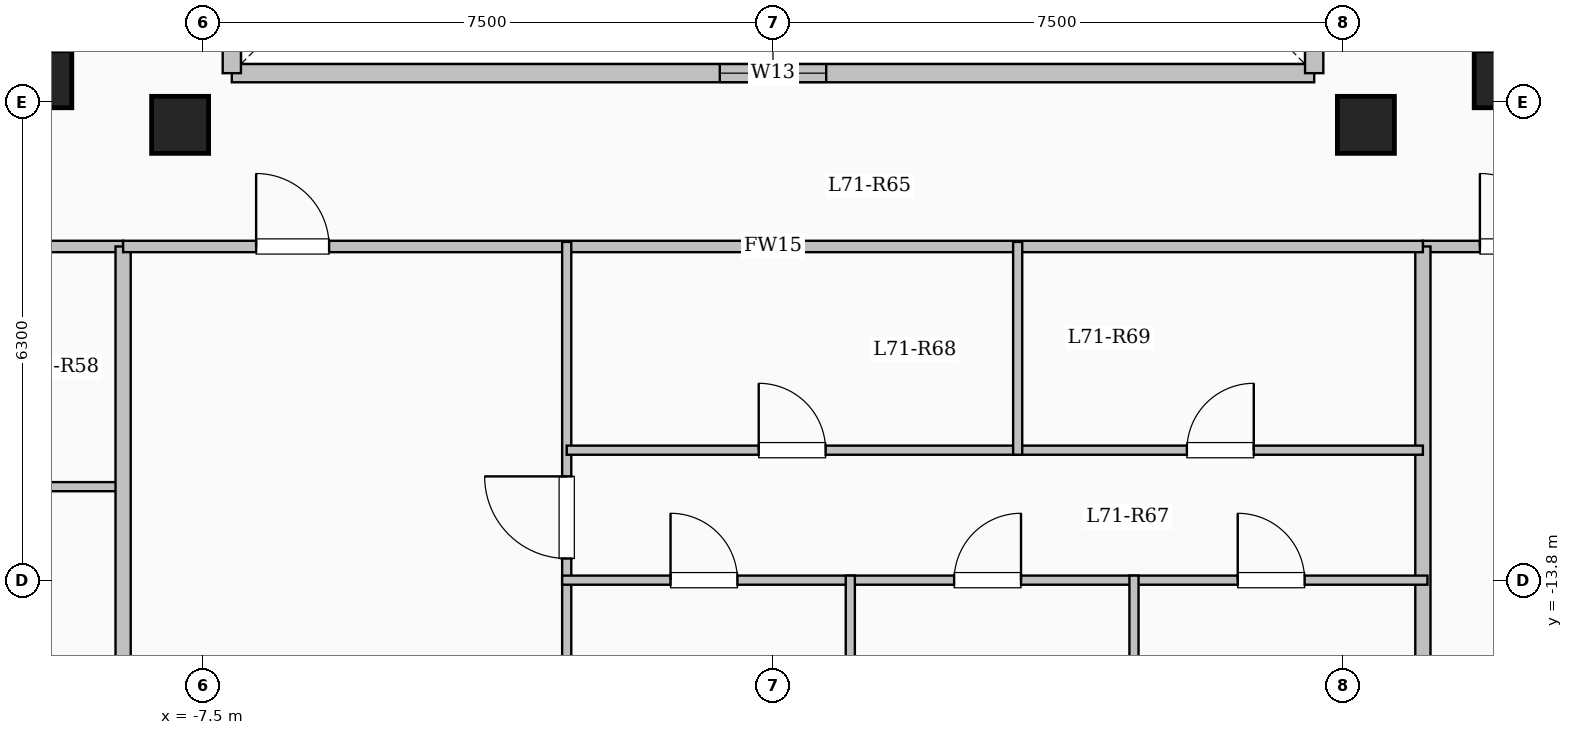
"""IFC4 building model, lengths in metres.
Left out: names, types, materials, properties, quantities, classifications, styles, units other than length and angle.
Written with IfcOpenShell. Run it as: python <this file> out.ifc"""

import sys

from ifc_helpers import new_model, si_unit, direction, frame, frame_2d, origin, origin_2d, place, context, subcontext, project, spatial, rectangle, extrude, element, fill, save


model = new_model("IFC4")
c1 = context("Model", 3, precision=1e-05, world=origin(), true_north=direction((0.0, 1.0)))
c2 = subcontext(c1, "Body", "Model", "MODEL_VIEW")
j1 = project(units=[si_unit("LENGTHUNIT", "METRE"), si_unit("PLANEANGLEUNIT", "RADIAN")], contexts=[c1])
p1 = place(None, origin())
s1 = spatial("IfcSite", under=j1, at=p1, CompositionType="ELEMENT")
p2 = place(p1, origin())
s2 = spatial("IfcBuilding", under=s1, at=p2, CompositionType="ELEMENT")
p3 = place(p2, frame((0.0, 0.0, 261.6)))
s3 = spatial("IfcBuildingStorey", under=s2, at=p3, CompositionType="ELEMENT", Elevation=261.6)
for number, where, z_axis, x_axis in (
    (1, (-7.8, -7.8, 0.0), (0.0, 0.0, 1.0), (1.0, 0.0, 0.0)),
    (2, (7.8, -7.8, 0.0), (0.0, 0.0, 1.0), (1.0, 0.0, 0.0)),
    (3, (-9.6, -7.2, 0.0), (0.0, 0.0, 1.0), (1.0, 0.0, 0.0)),
    (4, (9.6, -7.2, 0.0), (0.0, 0.0, 1.0), (1.0, 0.0, 0.0)),
):
    element("IfcColumn", number, at=place(p3, frame(where, z_axis=z_axis, x_axis=x_axis)), inside=s3, PredefinedType="COLUMN", context=c2, shape_type="SweptSolid", body=[
        extrude(rectangle(XDim=0.75, YDim=0.75, at=origin_2d()), origin(), (0.0, 0.0, 1.0), 3.35),
    ])
p4 = place(p3, frame((-7.12, -7.12, 0.0), z_axis=(0.0, 0.0, 1.0), x_axis=(1.0, 0.0, 0.0)))
e5 = element("IfcWall", 5, at=p4, inside=s3, PredefinedType="SOLIDWALL", context=c2, shape_type="SweptSolid", body=[
    extrude(rectangle(XDim=14.24, YDim=0.24, at=frame_2d((7.12, 0.0))), origin(), (0.0, 0.0, 1.0), 3.1),
])
p5 = place(p4, frame((6.42, 0.0, 0.95)))
e6 = element("IfcOpeningElement", 6, at=p5, cuts=e5, PredefinedType="OPENING", context=c2, shape_type="SweptSolid", body=[
    extrude(rectangle(XDim=1.4, YDim=1.5, at=frame_2d((0.7, 0.75))), frame((0.0, 0.13, 0.0), z_axis=(0.0, -1.0, 0.0), x_axis=(1.0, 0.0, 0.0)), (0.0, 0.0, 1.0), 0.26),
])
p6 = place(p3, frame((7.12, -7.12, 0.0), z_axis=(0.0, 0.0, 1.0), x_axis=(0.0, 1.0, 0.0)))
e7 = element("IfcWall", 7, at=p6, inside=s3, PredefinedType="SOLIDWALL", context=c2, shape_type="SweptSolid", body=[
    extrude(rectangle(XDim=14.24, YDim=0.24, at=frame_2d((7.12, 0.0))), origin(), (0.0, 0.0, 1.0), 3.1),
])
p7 = place(p6, frame((6.42, 0.0, 0.95)))
e8 = element("IfcOpeningElement", 8, at=p7, cuts=e7, PredefinedType="OPENING", context=c2, shape_type="SweptSolid", body=[
    extrude(rectangle(XDim=1.4, YDim=1.5, at=frame_2d((0.7, 0.75))), frame((0.0, 0.13, 0.0), z_axis=(0.0, -1.0, 0.0), x_axis=(1.0, 0.0, 0.0)), (0.0, 0.0, 1.0), 0.26),
])
p8 = place(p3, frame((-7.12, 7.12, 0.0), z_axis=(0.0, 0.0, 1.0), x_axis=(0.0, -1.0, 0.0)))
e9 = element("IfcWall", 9, at=p8, inside=s3, PredefinedType="SOLIDWALL", context=c2, shape_type="SweptSolid", body=[
    extrude(rectangle(XDim=14.24, YDim=0.24, at=frame_2d((7.12, 0.0))), origin(), (0.0, 0.0, 1.0), 3.1),
])
p9 = place(p8, frame((6.42, 0.0, 0.95)))
e10 = element("IfcOpeningElement", 10, at=p9, cuts=e9, PredefinedType="OPENING", context=c2, shape_type="SweptSolid", body=[
    extrude(rectangle(XDim=1.4, YDim=1.5, at=frame_2d((0.7, 0.75))), frame((0.0, 0.13, 0.0), z_axis=(0.0, -1.0, 0.0), x_axis=(1.0, 0.0, 0.0)), (0.0, 0.0, 1.0), 0.26),
])
p10 = place(p3, frame((-17.75, -9.4, 0.0), z_axis=(0.0, 0.0, 1.0), x_axis=(1.0, 0.0, 0.0)))
e11 = element("IfcWall", 11, at=p10, inside=s3, PredefinedType="PARTITIONING", context=c2, shape_type="SweptSolid", body=[
    extrude(rectangle(XDim=9.2, YDim=0.15, at=frame_2d((4.6, 0.0))), origin(), (0.0, 0.0, 1.0), 3.1),
])
p11 = place(p10, frame((0.7, 0.0, 0.0)))
e12 = element("IfcOpeningElement", 12, at=p11, cuts=e11, PredefinedType="OPENING", context=c2, shape_type="SweptSolid", body=[
    extrude(rectangle(XDim=0.96, YDim=2.15, at=frame_2d((0.48, 1.075))), frame((0.0, 0.085, 0.0), z_axis=(0.0, -1.0, 0.0), x_axis=(1.0, 0.0, 0.0)), (0.0, 0.0, 1.0), 0.17),
])
p12 = place(p10, frame((5.275, 0.0, 0.0)))
e13 = element("IfcOpeningElement", 13, at=p12, cuts=e11, PredefinedType="OPENING", context=c2, shape_type="SweptSolid", body=[
    extrude(rectangle(XDim=0.96, YDim=2.15, at=frame_2d((0.48, 1.075))), frame((0.0, 0.085, 0.0), z_axis=(0.0, -1.0, 0.0), x_axis=(1.0, 0.0, 0.0)), (0.0, 0.0, 1.0), 0.17),
])
p13 = place(p3, frame((8.55, -9.4, 0.0), z_axis=(0.0, 0.0, 1.0), x_axis=(1.0, 0.0, 0.0)))
e14 = element("IfcWall", 14, at=p13, inside=s3, PredefinedType="PARTITIONING", context=c2, shape_type="SweptSolid", body=[
    extrude(rectangle(XDim=9.2, YDim=0.15, at=frame_2d((4.6, 0.0))), origin(), (0.0, 0.0, 1.0), 3.1),
])
p14 = place(p13, frame((0.75, 0.0, 0.0)))
e15 = element("IfcOpeningElement", 15, at=p14, cuts=e14, PredefinedType="OPENING", context=c2, shape_type="SweptSolid", body=[
    extrude(rectangle(XDim=0.96, YDim=2.15, at=frame_2d((0.48, 1.075))), frame((0.0, 0.085, 0.0), z_axis=(0.0, -1.0, 0.0), x_axis=(1.0, 0.0, 0.0)), (0.0, 0.0, 1.0), 0.17),
])
p15 = place(p13, frame((5.142, 0.0, 0.0)))
e16 = element("IfcOpeningElement", 16, at=p15, cuts=e14, PredefinedType="OPENING", context=c2, shape_type="SweptSolid", body=[
    extrude(rectangle(XDim=0.96, YDim=2.15, at=frame_2d((0.48, 1.075))), frame((0.0, 0.085, 0.0), z_axis=(0.0, -1.0, 0.0), x_axis=(1.0, 0.0, 0.0)), (0.0, 0.0, 1.0), 0.17),
])
p16 = place(p3, frame((-10.775, -12.56, 0.0), z_axis=(0.0, 0.0, 1.0), x_axis=(1.0, 0.0, 0.0)))
e17 = element("IfcWall", 17, at=p16, inside=s3, PredefinedType="PARTITIONING", context=c2, shape_type="SweptSolid", body=[
    extrude(rectangle(XDim=2.235, YDim=0.12, at=frame_2d((1.117, 0.0))), origin(), (0.0, 0.0, 1.0), 2.785),
])
for number, where, z_axis, x_axis in (
    (18, (-8.55, -21.504, 0.0), (0.0, 0.0, 1.0), (0.0, 1.0, 0.0)),
    (19, (8.55, -21.504, 0.0), (0.0, 0.0, 1.0), (0.0, 1.0, 0.0)),
):
    element("IfcWall", number, at=place(p3, frame(where, z_axis=z_axis, x_axis=x_axis)), inside=s3, PredefinedType="SOLIDWALL", context=c2, shape_type="SweptSolid", body=[
        extrude(rectangle(XDim=12.104, YDim=0.2, at=frame_2d((6.052, 0.0))), origin(), (0.0, 0.0, 1.0), 3.1),
    ])
p17 = place(p3, frame((-8.55, -9.4, 0.0), z_axis=(0.0, 0.0, 1.0), x_axis=(1.0, 0.0, 0.0)))
e20 = element("IfcWall", 20, at=p17, inside=s3, PredefinedType="PARTITIONING", context=c2, shape_type="SweptSolid", body=[
    extrude(rectangle(XDim=17.1, YDim=0.15, at=frame_2d((8.55, 0.0))), origin(), (0.0, 0.0, 1.0), 3.1),
])
p18 = place(p17, frame((1.75, 0.0, 0.0)))
e21 = element("IfcOpeningElement", 21, at=p18, cuts=e20, PredefinedType="OPENING", context=c2, shape_type="SweptSolid", body=[
    extrude(rectangle(XDim=0.96, YDim=2.15, at=frame_2d((0.48, 1.075))), frame((0.0, 0.085, 0.0), z_axis=(0.0, -1.0, 0.0), x_axis=(1.0, 0.0, 0.0)), (0.0, 0.0, 1.0), 0.17),
])
p19 = place(p3, frame((-2.714, -22.38, 0.0), z_axis=(0.0, 0.0, 1.0), x_axis=(0.0, 1.0, 0.0)))
e22 = element("IfcWall", 22, at=p19, inside=s3, PredefinedType="PARTITIONING", context=c2, shape_type="SweptSolid", body=[
    extrude(rectangle(XDim=13.04, YDim=0.12, at=frame_2d((6.52, 0.0))), origin(), (0.0, 0.0, 1.0), 3.1),
])
p20 = place(p19, frame((8.875, 0.0, 0.0)))
e23 = element("IfcOpeningElement", 23, at=p20, cuts=e22, PredefinedType="OPENING", context=c2, shape_type="SweptSolid", body=[
    extrude(rectangle(XDim=1.08, YDim=2.15, at=frame_2d((0.54, 1.075))), frame((0.0, 0.07, 0.0), z_axis=(0.0, -1.0, 0.0), x_axis=(1.0, 0.0, 0.0)), (0.0, 0.0, 1.0), 0.14),
])
p21 = place(p3, frame((-2.714, -12.08, 0.0), z_axis=(0.0, 0.0, 1.0), x_axis=(1.0, 0.0, 0.0)))
e24 = element("IfcWall", 24, at=p21, inside=s3, PredefinedType="PARTITIONING", context=c2, shape_type="SweptSolid", body=[
    extrude(rectangle(XDim=5.933, YDim=0.12, at=frame_2d((2.967, 0.0))), origin(), (0.0, 0.0, 1.0), 2.785),
])
p22 = place(p21, frame((2.526, 0.0, 0.0)))
e25 = element("IfcOpeningElement", 25, at=p22, cuts=e24, PredefinedType="OPENING", context=c2, shape_type="SweptSolid", body=[
    extrude(rectangle(XDim=0.88, YDim=2.1, at=frame_2d((0.44, 1.05))), frame((0.0, 0.07, 0.0), z_axis=(0.0, -1.0, 0.0), x_axis=(1.0, 0.0, 0.0)), (0.0, 0.0, 1.0), 0.14),
])
p23 = place(p3, frame((3.219, -12.08, 0.0), z_axis=(0.0, 0.0, 1.0), x_axis=(1.0, 0.0, 0.0)))
e26 = element("IfcWall", 26, at=p23, inside=s3, PredefinedType="PARTITIONING", context=c2, shape_type="SweptSolid", body=[
    extrude(rectangle(XDim=5.331, YDim=0.12, at=frame_2d((2.666, 0.0))), origin(), (0.0, 0.0, 1.0), 2.785),
])
p24 = place(p23, frame((2.226, 0.0, 0.0)))
e27 = element("IfcOpeningElement", 27, at=p24, cuts=e26, PredefinedType="OPENING", context=c2, shape_type="SweptSolid", body=[
    extrude(rectangle(XDim=0.88, YDim=2.1, at=frame_2d((0.44, 1.05))), frame((0.0, 0.07, 0.0), z_axis=(0.0, -1.0, 0.0), x_axis=(1.0, 0.0, 0.0)), (0.0, 0.0, 1.0), 0.14),
])
p25 = place(p3, frame((-2.774, -13.79, 0.0), z_axis=(0.0, 0.0, 1.0), x_axis=(1.0, 0.0, 0.0)))
e28 = element("IfcWall", 28, at=p25, inside=s3, PredefinedType="PARTITIONING", context=c2, shape_type="SweptSolid", body=[
    extrude(rectangle(XDim=11.384, YDim=0.12, at=frame_2d((5.692, 0.0))), origin(), (0.0, 0.0, 1.0), 2.785),
])
p26 = place(p25, frame((1.426, 0.0, 0.0)))
e29 = element("IfcOpeningElement", 29, at=p26, cuts=e28, PredefinedType="OPENING", context=c2, shape_type="SweptSolid", body=[
    extrude(rectangle(XDim=0.88, YDim=2.1, at=frame_2d((0.44, 1.05))), frame((0.0, 0.07, 0.0), z_axis=(0.0, -1.0, 0.0), x_axis=(1.0, 0.0, 0.0)), (0.0, 0.0, 1.0), 0.14),
])
p27 = place(p25, frame((5.157, 0.0, 0.0)))
e30 = element("IfcOpeningElement", 30, at=p27, cuts=e28, PredefinedType="OPENING", context=c2, shape_type="SweptSolid", body=[
    extrude(rectangle(XDim=0.88, YDim=2.1, at=frame_2d((0.44, 1.05))), frame((0.0, 0.07, 0.0), z_axis=(0.0, -1.0, 0.0), x_axis=(1.0, 0.0, 0.0)), (0.0, 0.0, 1.0), 0.14),
])
p28 = place(p25, frame((8.888, 0.0, 0.0)))
e31 = element("IfcOpeningElement", 31, at=p28, cuts=e28, PredefinedType="OPENING", context=c2, shape_type="SweptSolid", body=[
    extrude(rectangle(XDim=0.88, YDim=2.1, at=frame_2d((0.44, 1.05))), frame((0.0, 0.07, 0.0), z_axis=(0.0, -1.0, 0.0), x_axis=(1.0, 0.0, 0.0)), (0.0, 0.0, 1.0), 0.14),
])
p29 = place(p3, frame((3.219, -12.14, 0.0), z_axis=(0.0, 0.0, 1.0), x_axis=(0.0, 1.0, 0.0)))
e32 = element("IfcWall", 32, at=p29, inside=s3, PredefinedType="PARTITIONING", context=c2, shape_type="SweptSolid", body=[
    extrude(rectangle(XDim=2.8, YDim=0.12, at=frame_2d((1.4, 0.0))), origin(), (0.0, 0.0, 1.0), 3.1),
])
for number, where, z_axis, x_axis in (
    (33, (1.017, -22.38, 0.0), (0.0, 0.0, 1.0), (0.0, 1.0, 0.0)),
    (34, (4.749, -22.38, 0.0), (0.0, 0.0, 1.0), (0.0, 1.0, 0.0)),
):
    element("IfcWall", number, at=place(p3, frame(where, z_axis=z_axis, x_axis=x_axis)), inside=s3, PredefinedType="PARTITIONING", context=c2, shape_type="SweptSolid", body=[
        extrude(rectangle(XDim=8.65, YDim=0.12, at=frame_2d((4.325, 0.0))), origin(), (0.0, 0.0, 1.0), 3.1),
    ])
p30 = place(p5, origin())
e35 = element("IfcWindow", 35, at=p30, inside=s3, PartitioningType="SINGLE_PANEL", PredefinedType="WINDOW", context=c2, shape_type="SweptSolid", body=[
    extrude(rectangle(XDim=1.4, YDim=1.5, at=frame_2d((0.7, 0.75))), frame((0.0, 0.03, 0.0), z_axis=(0.0, -1.0, 0.0), x_axis=(1.0, 0.0, 0.0)), (0.0, 0.0, 1.0), 0.06),
])
fill(e6, e35)
p31 = place(p14, origin())
e36 = element("IfcDoor", 36, at=p31, inside=s3, OperationType="SINGLE_SWING_LEFT", PredefinedType="DOOR", context=c2, shape_type="SweptSolid", body=[
    extrude(rectangle(XDim=0.96, YDim=2.15, at=frame_2d((0.48, 1.075))), frame((0.0, 0.025, 0.0), z_axis=(0.0, -1.0, 0.0), x_axis=(1.0, 0.0, 0.0)), (0.0, 0.0, 1.0), 0.05),
])
fill(e15, e36)
p32 = place(p18, origin())
e37 = element("IfcDoor", 37, at=p32, inside=s3, OperationType="SINGLE_SWING_LEFT", PredefinedType="DOOR", context=c2, shape_type="SweptSolid", body=[
    extrude(rectangle(XDim=0.96, YDim=2.15, at=frame_2d((0.48, 1.075))), frame((0.0, 0.025, 0.0), z_axis=(0.0, -1.0, 0.0), x_axis=(1.0, 0.0, 0.0)), (0.0, 0.0, 1.0), 0.05),
])
fill(e21, e37)
p33 = place(p20, origin())
e38 = element("IfcDoor", 38, at=p33, inside=s3, OperationType="SINGLE_SWING_RIGHT", PredefinedType="DOOR", context=c2, shape_type="SweptSolid", body=[
    extrude(rectangle(XDim=1.08, YDim=2.15, at=frame_2d((0.54, 1.075))), frame((0.0, 0.025, 0.0), z_axis=(0.0, -1.0, 0.0), x_axis=(1.0, 0.0, 0.0)), (0.0, 0.0, 1.0), 0.05),
])
fill(e23, e38)
p34 = place(p22, origin())
e39 = element("IfcDoor", 39, at=p34, inside=s3, OperationType="SINGLE_SWING_LEFT", PredefinedType="DOOR", context=c2, shape_type="SweptSolid", body=[
    extrude(rectangle(XDim=0.88, YDim=2.1, at=frame_2d((0.44, 1.05))), frame((0.0, 0.025, 0.0), z_axis=(0.0, -1.0, 0.0), x_axis=(1.0, 0.0, 0.0)), (0.0, 0.0, 1.0), 0.05),
])
fill(e25, e39)
p35 = place(p24, origin())
e40 = element("IfcDoor", 40, at=p35, inside=s3, OperationType="SINGLE_SWING_RIGHT", PredefinedType="DOOR", context=c2, shape_type="SweptSolid", body=[
    extrude(rectangle(XDim=0.88, YDim=2.1, at=frame_2d((0.44, 1.05))), frame((0.0, 0.025, 0.0), z_axis=(0.0, -1.0, 0.0), x_axis=(1.0, 0.0, 0.0)), (0.0, 0.0, 1.0), 0.05),
])
fill(e27, e40)
p36 = place(p26, origin())
e41 = element("IfcDoor", 41, at=p36, inside=s3, OperationType="SINGLE_SWING_LEFT", PredefinedType="DOOR", context=c2, shape_type="SweptSolid", body=[
    extrude(rectangle(XDim=0.88, YDim=2.1, at=frame_2d((0.44, 1.05))), frame((0.0, 0.025, 0.0), z_axis=(0.0, -1.0, 0.0), x_axis=(1.0, 0.0, 0.0)), (0.0, 0.0, 1.0), 0.05),
])
fill(e29, e41)
p37 = place(p27, origin())
e42 = element("IfcDoor", 42, at=p37, inside=s3, OperationType="SINGLE_SWING_RIGHT", PredefinedType="DOOR", context=c2, shape_type="SweptSolid", body=[
    extrude(rectangle(XDim=0.88, YDim=2.1, at=frame_2d((0.44, 1.05))), frame((0.0, 0.025, 0.0), z_axis=(0.0, -1.0, 0.0), x_axis=(1.0, 0.0, 0.0)), (0.0, 0.0, 1.0), 0.05),
])
fill(e30, e42)
p38 = place(p28, origin())
e43 = element("IfcDoor", 43, at=p38, inside=s3, OperationType="SINGLE_SWING_LEFT", PredefinedType="DOOR", context=c2, shape_type="SweptSolid", body=[
    extrude(rectangle(XDim=0.88, YDim=2.1, at=frame_2d((0.44, 1.05))), frame((0.0, 0.025, 0.0), z_axis=(0.0, -1.0, 0.0), x_axis=(1.0, 0.0, 0.0)), (0.0, 0.0, 1.0), 0.05),
])
fill(e31, e43)
save(model, sys.argv[1])
